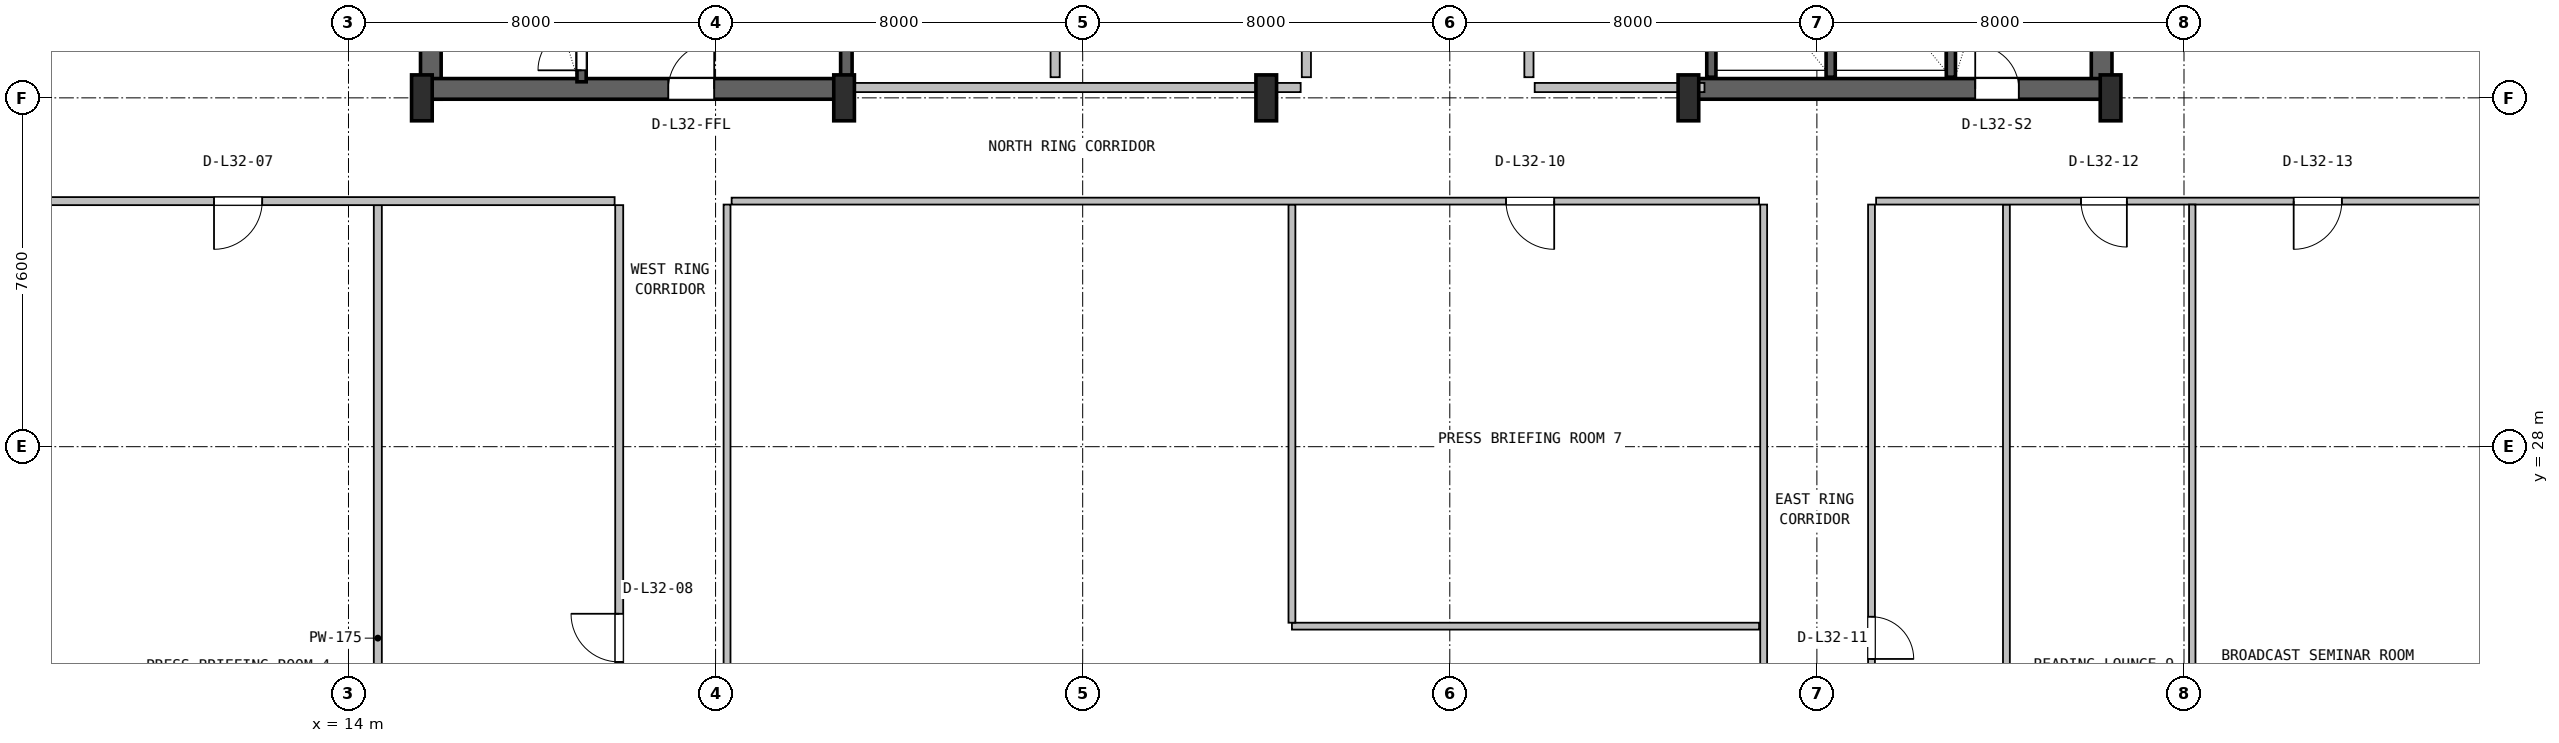
"""IFC4 building model, lengths in metres.
Left out: names, types, materials, properties, quantities, classifications, styles, units other than length and angle.
Written with IfcOpenShell. Run it as: python <this file> out.ifc"""

import sys

from ifc_helpers import new_model, si_unit, direction, frame, frame_2d, origin, origin_2d, place, context, subcontext, project, spatial, rectangle, i_section, extrude, source, transform, mapped, element, fill, save


model = new_model("IFC4")
c1 = context("Model", 3, precision=1e-05, world=origin(), true_north=direction((0.0, 1.0)))
c2 = subcontext(c1, "Body", "Model", "MODEL_VIEW")
j1 = project(units=[si_unit("LENGTHUNIT", "METRE"), si_unit("PLANEANGLEUNIT", "RADIAN")], contexts=[c1])
p1 = place(None, origin())
s1 = spatial("IfcSite", under=j1, at=p1, CompositionType="ELEMENT")
p2 = place(p1, origin())
s2 = spatial("IfcBuilding", under=s1, at=p2, CompositionType="ELEMENT")
p3 = place(p2, frame((0.0, 0.0, 133.4)))
s3 = spatial("IfcBuildingStorey", under=s2, at=p3, CompositionType="ELEMENT", Elevation=133.4)
for number, where, z_axis, x_axis in (
    (1, (15.795, 35.57, 0.0), (0.0, 0.0, 1.0), (0.0, 1.0, 0.0)),
    (2, (52.205, 35.57, 0.0), (0.0, 0.0, 1.0), (0.0, 1.0, 0.0)),
):
    element("IfcWall", number, at=place(p3, frame(where, z_axis=z_axis, x_axis=x_axis)), inside=s3, PredefinedType="SHEAR", context=c2, shape_type="SweptSolid", body=[
        extrude(rectangle(XDim=11.23, YDim=0.45, at=frame_2d((5.615, 0.0))), origin(), (0.0, 0.0, 1.0), 3.55),
    ])
p4 = place(p3, frame((15.57, 35.795, 0.0), z_axis=(0.0, 0.0, 1.0), x_axis=(1.0, 0.0, 0.0)))
e3 = element("IfcWall", 3, at=p4, inside=s3, PredefinedType="SHEAR", context=c2, shape_type="SweptSolid", body=[
    extrude(rectangle(XDim=9.23, YDim=0.45, at=frame_2d((4.615, 0.0))), origin(), (0.0, 0.0, 1.0), 3.55),
])
p5 = place(p4, frame((5.4, 0.0, 0.0)))
e4 = element("IfcOpeningElement", 4, at=p5, cuts=e3, PredefinedType="OPENING", context=c2, shape_type="SweptSolid", body=[
    extrude(rectangle(XDim=1.0, YDim=2.1, at=frame_2d((0.5, 1.05))), frame((0.0, 0.235, 0.0), z_axis=(0.0, -1.0, 0.0), x_axis=(1.0, 0.0, 0.0)), (0.0, 0.0, 1.0), 0.47),
])
p6 = place(p3, frame((43.2, 35.795, 0.0), z_axis=(0.0, 0.0, 1.0), x_axis=(1.0, 0.0, 0.0)))
e5 = element("IfcWall", 5, at=p6, inside=s3, PredefinedType="SHEAR", context=c2, shape_type="SweptSolid", body=[
    extrude(rectangle(XDim=9.23, YDim=0.45, at=frame_2d((4.615, 0.0))), origin(), (0.0, 0.0, 1.0), 3.55),
])
p7 = place(p6, frame((6.25, 0.0, 0.0)))
e6 = element("IfcOpeningElement", 6, at=p7, cuts=e5, PredefinedType="OPENING", context=c2, shape_type="SweptSolid", body=[
    extrude(rectangle(XDim=0.95, YDim=2.1, at=frame_2d((0.475, 1.05))), frame((0.0, 0.235, 0.0), z_axis=(0.0, -1.0, 0.0), x_axis=(1.0, 0.0, 0.0)), (0.0, 0.0, 1.0), 0.47),
])
m1 = source(origin(), c2, "Body", "SweptSolid", [
    extrude(i_section(OverallWidth=0.45, OverallDepth=1.0, WebThickness=0.016, FlangeThickness=0.03, FilletRadius=0.016, at=origin_2d()), origin(), (0.0, 0.0, 1.0), 3.8),
])
for number, where, z_axis, x_axis in (
    (7, (15.6, 35.6, 0.0), (0.0, 0.0, 1.0), (1.0, 0.0, 0.0)),
    (8, (24.8, 35.6, 0.0), (0.0, 0.0, 1.0), (1.0, 0.0, 0.0)),
    (9, (34.0, 35.6, 0.0), (0.0, 0.0, 1.0), (1.0, 0.0, 0.0)),
    (10, (43.2, 35.6, 0.0), (0.0, 0.0, 1.0), (1.0, 0.0, 0.0)),
    (11, (52.4, 35.6, 0.0), (0.0, 0.0, 1.0), (1.0, 0.0, 0.0)),
):
    element("IfcColumn", number, at=place(p3, frame(where, z_axis=z_axis, x_axis=x_axis)), inside=s3, PredefinedType="COLUMN", context=c2, shape_type="MappedRepresentation", body=[
        mapped(m1, transform((0.0, 0.0, 0.0), x_axis=(1.0, 0.0, 0.0), y_axis=(0.0, 1.0, 0.0), z_axis=(0.0, 0.0, 1.0), scale=1.0)),
    ])
p8 = place(p3, frame((19.08, 35.95, 0.0), z_axis=(0.0, 0.0, 1.0), x_axis=(0.0, 1.0, 0.0)))
e12 = element("IfcWall", 12, at=p8, inside=s3, PredefinedType="SHEAR", context=c2, shape_type="SweptSolid", body=[
    extrude(rectangle(XDim=9.65, YDim=0.2, at=frame_2d((4.825, 0.0))), origin(), (0.0, 0.0, 1.0), 3.55),
])
p9 = place(p8, frame((0.25, 0.0, 0.0)))
e13 = element("IfcOpeningElement", 13, at=p9, cuts=e12, PredefinedType="OPENING", context=c2, shape_type="SweptSolid", body=[
    extrude(rectangle(XDim=0.95, YDim=2.1, at=frame_2d((0.475, 1.05))), frame((0.0, 0.11, 0.0), z_axis=(0.0, -1.0, 0.0), x_axis=(1.0, 0.0, 0.0)), (0.0, 0.0, 1.0), 0.22),
])
p10 = place(p3, frame((24.85, 36.05, 0.0), z_axis=(0.0, 0.0, 1.0), x_axis=(0.0, 1.0, 0.0)))
e14 = element("IfcWall", 14, at=p10, inside=s3, PredefinedType="SHEAR", context=c2, shape_type="SweptSolid", body=[
    extrude(rectangle(XDim=10.45, YDim=0.25, at=frame_2d((5.225, 0.0))), origin(), (0.0, 0.0, 1.0), 3.55),
])
p11 = place(p3, frame((48.92, 36.05, 0.0), z_axis=(0.0, 0.0, 1.0), x_axis=(0.0, 1.0, 0.0)))
e15 = element("IfcWall", 15, at=p11, inside=s3, PredefinedType="SHEAR", context=c2, shape_type="SweptSolid", body=[
    extrude(rectangle(XDim=10.5, YDim=0.2, at=frame_2d((5.25, 0.0))), origin(), (0.0, 0.0, 1.0), 3.55),
])
for number, where, z_axis, x_axis in (
    (16, (43.7, 36.05, 0.0), (0.0, 0.0, 1.0), (0.0, 1.0, 0.0)),
    (17, (46.3, 36.05, 0.0), (0.0, 0.0, 1.0), (0.0, 1.0, 0.0)),
):
    element("IfcWall", number, at=place(p3, frame(where, z_axis=z_axis, x_axis=x_axis)), inside=s3, PredefinedType="SHEAR", context=c2, shape_type="SweptSolid", body=[
        extrude(rectangle(XDim=3.05, YDim=0.2, at=frame_2d((1.525, 0.0))), origin(), (0.0, 0.0, 1.0), 3.55),
    ])
p12 = place(p3, frame((25.0, 35.825, 0.0), z_axis=(0.0, 0.0, 1.0), x_axis=(1.0, 0.0, 0.0)))
e18 = element("IfcWall", 18, at=p12, inside=s3, PredefinedType="PLUMBINGWALL", context=c2, shape_type="SweptSolid", body=[
    extrude(rectangle(XDim=9.75, YDim=0.2, at=frame_2d((4.875, 0.0))), origin(), (0.0, 0.0, 1.0), 2.325),
])
for number, where, z_axis, x_axis in (
    (19, (29.4, 36.05, 0.0), (0.0, 0.0, 1.0), (0.0, 1.0, 0.0)),
    (20, (34.875, 36.05, 0.0), (0.0, 0.0, 1.0), (0.0, 1.0, 0.0)),
):
    element("IfcWall", number, at=place(p3, frame(where, z_axis=z_axis, x_axis=x_axis)), inside=s3, PredefinedType="PLUMBINGWALL", context=c2, shape_type="SweptSolid", body=[
        extrude(rectangle(XDim=3.1, YDim=0.2, at=frame_2d((1.55, 0.0))), origin(), (0.0, 0.0, 1.0), 3.53),
    ])
p13 = place(p3, frame((39.85, 35.825, 0.0), z_axis=(0.0, 0.0, 1.0), x_axis=(1.0, 0.0, 0.0)))
e21 = element("IfcWall", 21, at=p13, inside=s3, PredefinedType="SOLIDWALL", context=c2, shape_type="SweptSolid", body=[
    extrude(rectangle(XDim=3.7, YDim=0.2, at=frame_2d((1.85, 0.0))), origin(), (0.0, 0.0, 1.0), 2.325),
])
p14 = place(p3, frame((39.725, 36.05, 0.0), z_axis=(0.0, 0.0, 1.0), x_axis=(0.0, 1.0, 0.0)))
e22 = element("IfcWall", 22, at=p14, inside=s3, PredefinedType="SOLIDWALL", context=c2, shape_type="SweptSolid", body=[
    extrude(rectangle(XDim=3.1, YDim=0.2, at=frame_2d((1.55, 0.0))), origin(), (0.0, 0.0, 1.0), 3.53),
])
p15 = place(p3, frame((14.64, 14.395, 0.0), z_axis=(0.0, 0.0, 1.0), x_axis=(0.0, 1.0, 0.0)))
e23 = element("IfcWall", 23, at=p15, inside=s3, PredefinedType="PARTITIONING", context=c2, shape_type="SweptSolid", body=[
    extrude(rectangle(XDim=18.868, YDim=0.175, at=frame_2d((9.434, 0.0))), origin(), (0.0, 0.0, 1.0), 3.222),
])
p16 = place(p3, frame((4.68, 33.35, 0.0), z_axis=(0.0, 0.0, 1.0), x_axis=(1.0, 0.0, 0.0)))
e24 = element("IfcWall", 24, at=p16, inside=s3, PredefinedType="PARTITIONING", context=c2, shape_type="SweptSolid", body=[
    extrude(rectangle(XDim=15.12, YDim=0.175, at=frame_2d((7.56, 0.0))), origin(), (0.0, 0.0, 1.0), 3.108),
])
p17 = place(p16, frame((6.39, 0.0, 0.0)))
e25 = element("IfcOpeningElement", 25, at=p17, cuts=e24, PredefinedType="OPENING", context=c2, shape_type="SweptSolid", body=[
    extrude(rectangle(XDim=1.05, YDim=2.1, at=frame_2d((0.525, 1.05))), frame((0.0, 0.098, 0.0), z_axis=(0.0, -1.0, 0.0), x_axis=(1.0, 0.0, 0.0)), (0.0, 0.0, 1.0), 0.195),
])
p18 = place(p3, frame((19.9, 14.395, 0.0), z_axis=(0.0, 0.0, 1.0), x_axis=(0.0, 1.0, 0.0)))
e26 = element("IfcWall", 26, at=p18, inside=s3, PredefinedType="PARTITIONING", context=c2, shape_type="SweptSolid", body=[
    extrude(rectangle(XDim=18.868, YDim=0.175, at=frame_2d((9.434, 0.0))), origin(), (0.0, 0.0, 1.0), 3.222),
])
p19 = place(p18, frame((8.915, 0.0, 0.0)))
e27 = element("IfcOpeningElement", 27, at=p19, cuts=e26, PredefinedType="OPENING", context=c2, shape_type="SweptSolid", body=[
    extrude(rectangle(XDim=1.05, YDim=2.1, at=frame_2d((0.525, 1.05))), frame((0.0, 0.098, 0.0), z_axis=(0.0, -1.0, 0.0), x_axis=(1.0, 0.0, 0.0)), (0.0, 0.0, 1.0), 0.195),
])
p20 = place(p3, frame((44.84, 16.745, 0.0), z_axis=(0.0, 0.0, 1.0), x_axis=(0.0, 1.0, 0.0)))
e28 = element("IfcWall", 28, at=p20, inside=s3, PredefinedType="PARTITIONING", context=c2, shape_type="SweptSolid", body=[
    extrude(rectangle(XDim=16.53, YDim=0.15, at=frame_2d((8.265, 0.0))), origin(), (0.0, 0.0, 1.0), 3.222),
])
p21 = place(p3, frame((34.56, 24.09, 0.0), z_axis=(0.0, 0.0, 1.0), x_axis=(1.0, 0.0, 0.0)))
e29 = element("IfcWall", 29, at=p21, inside=s3, PredefinedType="PARTITIONING", context=c2, shape_type="SweptSolid", body=[
    extrude(rectangle(XDim=10.18, YDim=0.15, at=frame_2d((5.09, 0.0))), origin(), (0.0, 0.0, 1.0), 2.83),
])
p22 = place(p3, frame((34.56, 24.165, 0.0), z_axis=(0.0, 0.0, 1.0), x_axis=(0.0, 1.0, 0.0)))
e30 = element("IfcWall", 30, at=p22, inside=s3, PredefinedType="PARTITIONING", context=c2, shape_type="SweptSolid", body=[
    extrude(rectangle(XDim=9.11, YDim=0.15, at=frame_2d((4.555, 0.0))), origin(), (0.0, 0.0, 1.0), 3.222),
])
p23 = place(p3, frame((22.35, 33.35, 0.0), z_axis=(0.0, 0.0, 1.0), x_axis=(1.0, 0.0, 0.0)))
e31 = element("IfcWall", 31, at=p23, inside=s3, PredefinedType="PARTITIONING", context=c2, shape_type="SweptSolid", body=[
    extrude(rectangle(XDim=22.39, YDim=0.15, at=frame_2d((11.195, 0.0))), origin(), (0.0, 0.0, 1.0), 2.83),
])
p24 = place(p23, frame((16.875, 0.0, 0.0)))
e32 = element("IfcOpeningElement", 32, at=p24, cuts=e31, PredefinedType="OPENING", context=c2, shape_type="SweptSolid", body=[
    extrude(rectangle(XDim=1.05, YDim=2.1, at=frame_2d((0.525, 1.05))), frame((0.0, 0.085, 0.0), z_axis=(0.0, -1.0, 0.0), x_axis=(1.0, 0.0, 0.0)), (0.0, 0.0, 1.0), 0.17),
])
p25 = place(p3, frame((22.25, 16.745, 0.0), z_axis=(0.0, 0.0, 1.0), x_axis=(0.0, 1.0, 0.0)))
e33 = element("IfcWall", 33, at=p25, inside=s3, PredefinedType="PARTITIONING", context=c2, shape_type="SweptSolid", body=[
    extrude(rectangle(XDim=16.53, YDim=0.15, at=frame_2d((8.265, 0.0))), origin(), (0.0, 0.0, 1.0), 3.222),
])
p26 = place(p3, frame((50.13, 14.395, 0.0), z_axis=(0.0, 0.0, 1.0), x_axis=(0.0, 1.0, 0.0)))
e34 = element("IfcWall", 34, at=p26, inside=s3, PredefinedType="PARTITIONING", context=c2, shape_type="SweptSolid", body=[
    extrude(rectangle(XDim=18.88, YDim=0.15, at=frame_2d((9.44, 0.0))), origin(), (0.0, 0.0, 1.0), 3.222),
])
p27 = place(p3, frame((47.29, 33.35, 0.0), z_axis=(0.0, 0.0, 1.0), x_axis=(1.0, 0.0, 0.0)))
e35 = element("IfcWall", 35, at=p27, inside=s3, PredefinedType="PARTITIONING", context=c2, shape_type="SweptSolid", body=[
    extrude(rectangle(XDim=16.03, YDim=0.15, at=frame_2d((8.015, 0.0))), origin(), (0.0, 0.0, 1.0), 3.108),
])
p28 = place(p27, frame((4.465, 0.0, 0.0)))
e36 = element("IfcOpeningElement", 36, at=p28, cuts=e35, PredefinedType="OPENING", context=c2, shape_type="SweptSolid", body=[
    extrude(rectangle(XDim=1.0, YDim=2.1, at=frame_2d((0.5, 1.05))), frame((0.0, 0.085, 0.0), z_axis=(0.0, -1.0, 0.0), x_axis=(1.0, 0.0, 0.0)), (0.0, 0.0, 1.0), 0.17),
])
p29 = place(p27, frame((9.1, 0.0, 0.0)))
e37 = element("IfcOpeningElement", 37, at=p29, cuts=e35, PredefinedType="OPENING", context=c2, shape_type="SweptSolid", body=[
    extrude(rectangle(XDim=1.05, YDim=2.1, at=frame_2d((0.525, 1.05))), frame((0.0, 0.085, 0.0), z_axis=(0.0, -1.0, 0.0), x_axis=(1.0, 0.0, 0.0)), (0.0, 0.0, 1.0), 0.17),
])
p30 = place(p3, frame((47.19, 14.395, 0.0), z_axis=(0.0, 0.0, 1.0), x_axis=(0.0, 1.0, 0.0)))
e38 = element("IfcWall", 38, at=p30, inside=s3, PredefinedType="PARTITIONING", context=c2, shape_type="SweptSolid", body=[
    extrude(rectangle(XDim=18.88, YDim=0.15, at=frame_2d((9.44, 0.0))), origin(), (0.0, 0.0, 1.0), 3.222),
])
p31 = place(p30, frame((8.98, 0.0, 0.0)))
e39 = element("IfcOpeningElement", 39, at=p31, cuts=e38, PredefinedType="OPENING", context=c2, shape_type="SweptSolid", body=[
    extrude(rectangle(XDim=0.92, YDim=2.08, at=frame_2d((0.46, 1.04))), frame((0.0, 0.085, 0.0), z_axis=(0.0, -1.0, 0.0), x_axis=(1.0, 0.0, 0.0)), (0.0, 0.0, 1.0), 0.17),
])
p32 = place(p3, frame((54.18, 14.395, 0.0), z_axis=(0.0, 0.0, 1.0), x_axis=(0.0, 1.0, 0.0)))
e40 = element("IfcWall", 40, at=p32, inside=s3, PredefinedType="PARTITIONING", context=c2, shape_type="SweptSolid", body=[
    extrude(rectangle(XDim=18.88, YDim=0.14, at=frame_2d((9.44, 0.0))), origin(), (0.0, 0.0, 1.0), 3.222),
])
m2 = source(origin(), c2, "Body", "SweptSolid", [
    extrude(rectangle(XDim=0.95, YDim=2.1, at=frame_2d((0.475, 1.05))), frame((0.0, 0.025, 0.0), z_axis=(0.0, -1.0, 0.0), x_axis=(1.0, 0.0, 0.0)), (0.0, 0.0, 1.0), 0.05),
])
p33 = place(p9, origin())
e41 = element("IfcDoor", 41, at=p33, inside=s3, OperationType="SINGLE_SWING_LEFT", PredefinedType="DOOR", context=c2, shape_type="MappedRepresentation", body=[
    mapped(m2, transform((0.0, 0.0, 0.0), x_axis=(1.0, 0.0, 0.0), y_axis=(0.0, 1.0, 0.0), z_axis=(0.0, 0.0, 1.0), scale=1.0)),
])
fill(e13, e41)
m3 = source(origin(), c2, "Body", "SweptSolid", [
    extrude(rectangle(XDim=1.0, YDim=2.1, at=frame_2d((0.5, 1.05))), frame((0.0, 0.025, 0.0), z_axis=(0.0, -1.0, 0.0), x_axis=(1.0, 0.0, 0.0)), (0.0, 0.0, 1.0), 0.05),
])
p34 = place(p5, origin())
e42 = element("IfcDoor", 42, at=p34, inside=s3, OperationType="SINGLE_SWING_RIGHT", PredefinedType="DOOR", context=c2, shape_type="MappedRepresentation", body=[
    mapped(m3, transform((0.0, 0.0, 0.0), x_axis=(1.0, 0.0, 0.0), y_axis=(0.0, 1.0, 0.0), z_axis=(0.0, 0.0, 1.0), scale=1.0)),
])
fill(e4, e42)
p35 = place(p7, origin())
e43 = element("IfcDoor", 43, at=p35, inside=s3, OperationType="SINGLE_SWING_LEFT", PredefinedType="DOOR", context=c2, shape_type="MappedRepresentation", body=[
    mapped(m2, transform((0.0, 0.0, 0.0), x_axis=(1.0, 0.0, 0.0), y_axis=(0.0, 1.0, 0.0), z_axis=(0.0, 0.0, 1.0), scale=1.0)),
])
fill(e6, e43)
m4 = source(origin(), c2, "Body", "SweptSolid", [
    extrude(rectangle(XDim=1.05, YDim=2.1, at=frame_2d((0.525, 1.05))), frame((0.0, 0.025, 0.0), z_axis=(0.0, -1.0, 0.0), x_axis=(1.0, 0.0, 0.0)), (0.0, 0.0, 1.0), 0.05),
])
p36 = place(p17, frame((1.05, 0.0, 0.0), z_axis=(0.0, 0.0, 1.0), x_axis=(-1.0, 0.0, 0.0)))
e44 = element("IfcDoor", 44, at=p36, inside=s3, OperationType="SINGLE_SWING_LEFT", PredefinedType="DOOR", context=c2, shape_type="MappedRepresentation", body=[
    mapped(m4, transform((0.0, 0.0, 0.0), x_axis=(1.0, 0.0, 0.0), y_axis=(0.0, 1.0, 0.0), z_axis=(0.0, 0.0, 1.0), scale=1.0)),
])
fill(e25, e44)
p37 = place(p19, origin())
e45 = element("IfcDoor", 45, at=p37, inside=s3, OperationType="SINGLE_SWING_RIGHT", PredefinedType="DOOR", context=c2, shape_type="MappedRepresentation", body=[
    mapped(m4, transform((0.0, 0.0, 0.0), x_axis=(1.0, 0.0, 0.0), y_axis=(0.0, 1.0, 0.0), z_axis=(0.0, 0.0, 1.0), scale=1.0)),
])
fill(e27, e45)
p38 = place(p24, frame((1.05, 0.0, 0.0), z_axis=(0.0, 0.0, 1.0), x_axis=(-1.0, 0.0, 0.0)))
e46 = element("IfcDoor", 46, at=p38, inside=s3, OperationType="SINGLE_SWING_RIGHT", PredefinedType="DOOR", context=c2, shape_type="MappedRepresentation", body=[
    mapped(m4, transform((0.0, 0.0, 0.0), x_axis=(1.0, 0.0, 0.0), y_axis=(0.0, 1.0, 0.0), z_axis=(0.0, 0.0, 1.0), scale=1.0)),
])
fill(e32, e46)
m5 = source(origin(), c2, "Body", "SweptSolid", [
    extrude(rectangle(XDim=0.92, YDim=2.08, at=frame_2d((0.46, 1.04))), frame((0.0, 0.025, 0.0), z_axis=(0.0, -1.0, 0.0), x_axis=(1.0, 0.0, 0.0)), (0.0, 0.0, 1.0), 0.05),
])
p39 = place(p31, frame((0.92, 0.0, 0.0), z_axis=(0.0, 0.0, 1.0), x_axis=(-1.0, 0.0, 0.0)))
e47 = element("IfcDoor", 47, at=p39, inside=s3, OperationType="SINGLE_SWING_LEFT", PredefinedType="DOOR", context=c2, shape_type="MappedRepresentation", body=[
    mapped(m5, transform((0.0, 0.0, 0.0), x_axis=(1.0, 0.0, 0.0), y_axis=(0.0, 1.0, 0.0), z_axis=(0.0, 0.0, 1.0), scale=1.0)),
])
fill(e39, e47)
m6 = source(origin(), c2, "Body", "SweptSolid", [
    extrude(rectangle(XDim=1.0, YDim=2.1, at=frame_2d((0.5, 1.05))), frame((0.0, 0.025, 0.0), z_axis=(0.0, -1.0, 0.0), x_axis=(1.0, 0.0, 0.0)), (0.0, 0.0, 1.0), 0.05),
])
p40 = place(p28, frame((1.0, 0.0, 0.0), z_axis=(0.0, 0.0, 1.0), x_axis=(-1.0, 0.0, 0.0)))
e48 = element("IfcDoor", 48, at=p40, inside=s3, OperationType="SINGLE_SWING_RIGHT", PredefinedType="DOOR", context=c2, shape_type="MappedRepresentation", body=[
    mapped(m6, transform((0.0, 0.0, 0.0), x_axis=(1.0, 0.0, 0.0), y_axis=(0.0, 1.0, 0.0), z_axis=(0.0, 0.0, 1.0), scale=1.0)),
])
fill(e36, e48)
p41 = place(p29, frame((1.05, 0.0, 0.0), z_axis=(0.0, 0.0, 1.0), x_axis=(-1.0, 0.0, 0.0)))
e49 = element("IfcDoor", 49, at=p41, inside=s3, OperationType="SINGLE_SWING_LEFT", PredefinedType="DOOR", context=c2, shape_type="MappedRepresentation", body=[
    mapped(m4, transform((0.0, 0.0, 0.0), x_axis=(1.0, 0.0, 0.0), y_axis=(0.0, 1.0, 0.0), z_axis=(0.0, 0.0, 1.0), scale=1.0)),
])
fill(e37, e49)
save(model, sys.argv[1])
